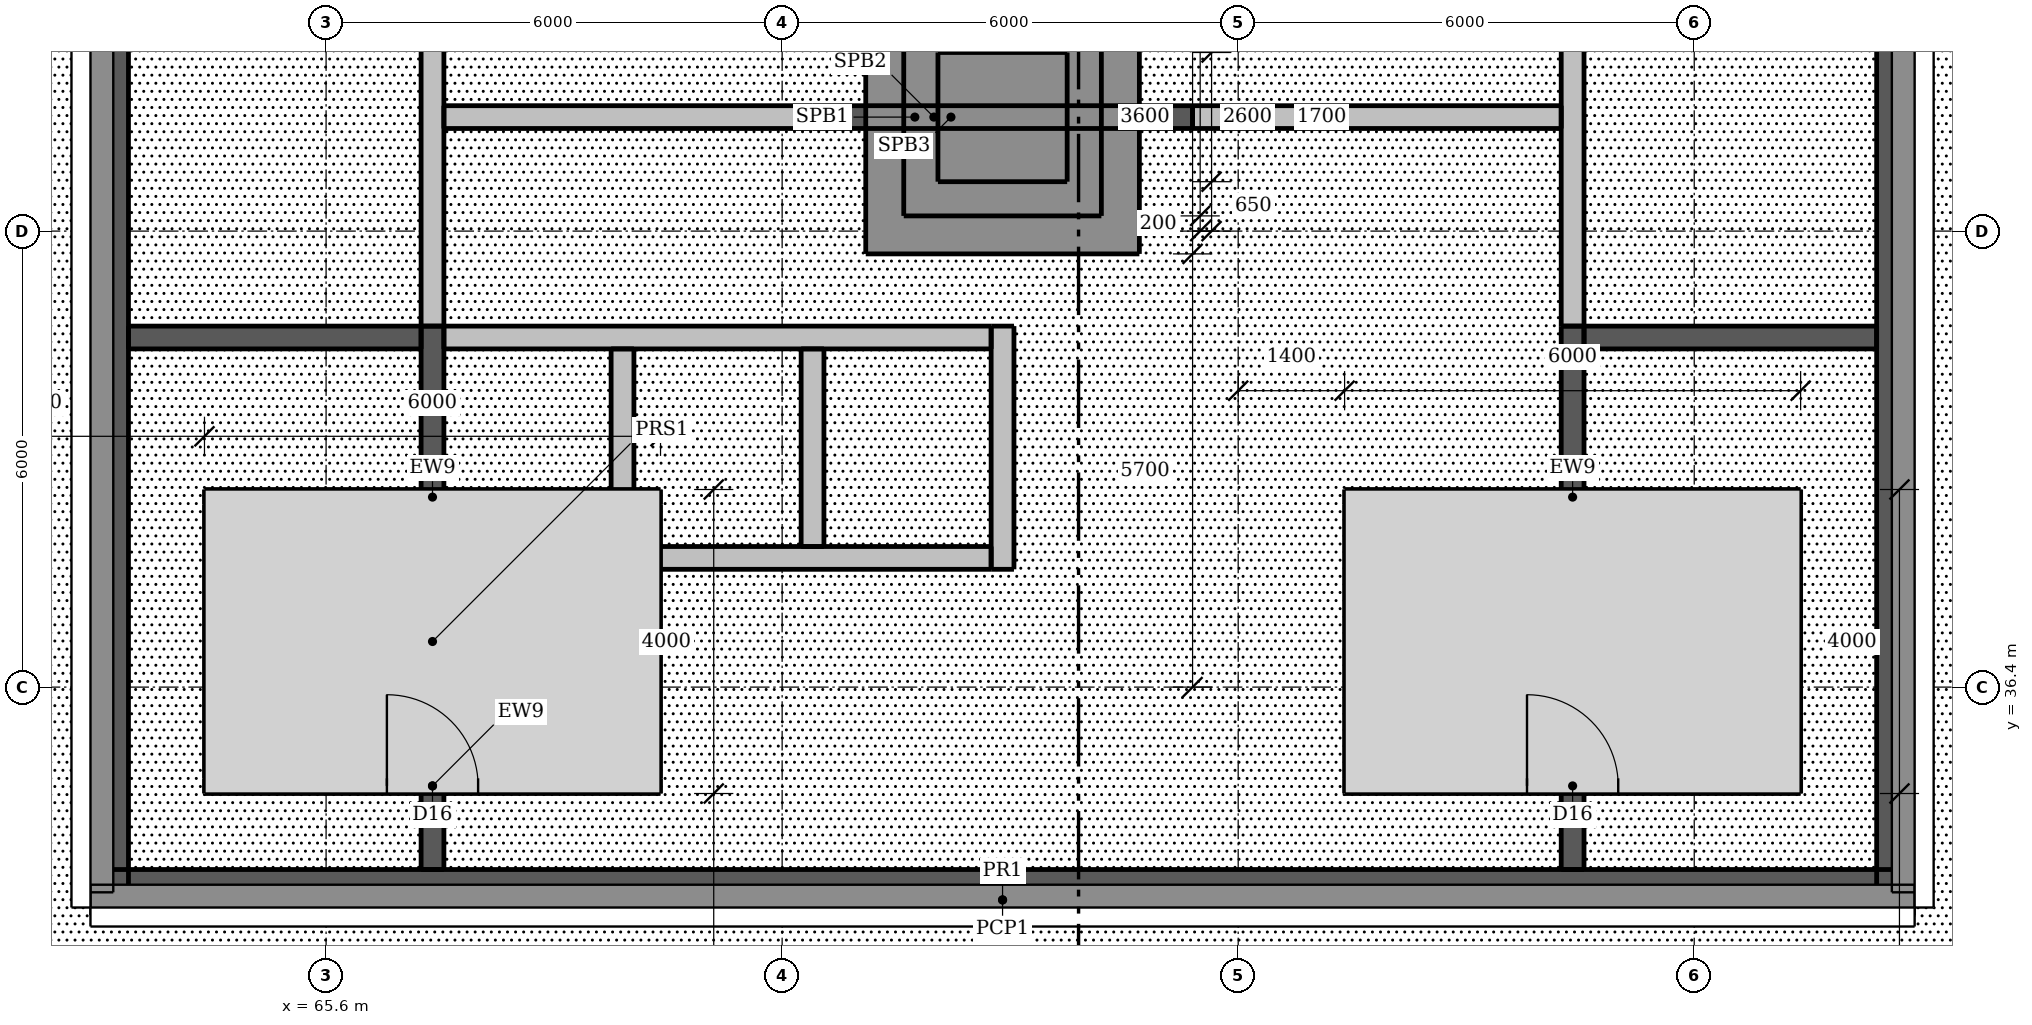
"""IFC4 building model, lengths in metres.
Left out: names, types, materials, properties, quantities, classifications, styles, units other than length and angle.
Written with IfcOpenShell. Run it as: python <this file> out.ifc"""

import sys

from ifc_helpers import new_model, si_unit, direction, frame, frame_2d, origin, place, context, subcontext, project, spatial, polyline, rectangle, outline, extrude, element, fill, save


model = new_model("IFC4")
c1 = context("Model", 3, precision=1e-05, world=origin(), true_north=direction((0.0, 1.0)))
c2 = subcontext(c1, "Body", "Model", "MODEL_VIEW")
j1 = project(units=[si_unit("LENGTHUNIT", "METRE"), si_unit("PLANEANGLEUNIT", "RADIAN")], contexts=[c1])
p1 = place(None, origin())
s1 = spatial("IfcSite", under=j1, at=p1, CompositionType="ELEMENT")
p2 = place(p1, origin())
s2 = spatial("IfcBuilding", under=s1, at=p2, CompositionType="ELEMENT")
p3 = place(p2, frame((0.0, 0.0, 301.6)))
s3 = spatial("IfcBuildingStorey", under=s2, at=p3, CompositionType="ELEMENT", Elevation=301.6)
for number, where, z_axis, x_axis in (
    (1, (62.5, 33.75, 0.0), (0.0, 0.0, 1.0), (1.0, 0.0, 0.0)),
    (2, (62.75, 33.5, 0.0), (0.0, 0.0, 1.0), (0.0, 1.0, 0.0)),
    (3, (86.25, 33.5, 0.0), (0.0, 0.0, 1.0), (0.0, 1.0, 0.0)),
):
    element("IfcWall", number, at=place(p3, frame(where, z_axis=z_axis, x_axis=x_axis)), inside=s3, PredefinedType="SHEAR", context=c2, shape_type="SweptSolid", body=[
        extrude(rectangle(XDim=24.0, YDim=0.5, at=frame_2d((12.0, 0.0))), origin(), (0.0, 0.0, 1.0), 6.9),
    ])
p4 = place(p3, frame((72.0, 43.9, 0.0), z_axis=(0.0, 0.0, 1.0), x_axis=(1.0, 0.0, 0.0)))
e4 = element("IfcWall", 4, at=p4, inside=s3, PredefinedType="SHEAR", context=c2, shape_type="SweptSolid", body=[
    extrude(rectangle(XDim=5.0, YDim=0.3, at=frame_2d((2.5, 0.0))), origin(), (0.0, 0.0, 1.0), 6.9),
])
p5 = place(p3, frame((62.5, 33.6, 7.2), z_axis=(0.0, 0.0, 1.0), x_axis=(1.0, 0.0, 0.0)))
e5 = element("IfcWall", 5, at=p5, inside=s3, PredefinedType="PARAPET", context=c2, shape_type="SweptSolid", body=[
    extrude(rectangle(XDim=24.0, YDim=0.2, at=frame_2d((12.0, 0.0))), origin(), (0.0, 0.0, 1.0), 1.1),
])
for number, where, z_axis, x_axis in (
    (6, (62.6, 33.7, 7.2), (0.0, 0.0, 1.0), (0.0, 1.0, 0.0)),
    (7, (86.4, 33.7, 7.2), (0.0, 0.0, 1.0), (0.0, 1.0, 0.0)),
):
    element("IfcWall", number, at=place(p3, frame(where, z_axis=z_axis, x_axis=x_axis)), inside=s3, PredefinedType="PARAPET", context=c2, shape_type="SweptSolid", body=[
        extrude(rectangle(XDim=23.6, YDim=0.2, at=frame_2d((11.8, 0.0))), origin(), (0.0, 0.0, 1.0), 1.1),
    ])
p6 = place(p3, frame((0.0, 0.0, 7.2)))
e8 = element("IfcWall", 8, at=p6, inside=s3, PredefinedType="SOLIDWALL", context=c2, shape_type="SweptSolid", body=[
    extrude(outline(polyline([(72.7, 42.1), (76.3, 42.1), (76.3, 45.7), (72.7, 45.7), (72.7, 42.1)]), holes=[polyline([(75.008, 44.111), (74.71, 44.408), (74.29, 44.408), (73.992, 44.111), (73.992, 43.689), (74.29, 43.392), (74.71, 43.392), (75.008, 43.689), (75.008, 44.111)])]), origin(), (0.0, 0.0, 1.0), 2.6),
])
p7 = place(p3, frame((0.0, 0.0, 9.8)))
e9 = element("IfcWall", 9, at=p7, inside=s3, PredefinedType="SOLIDWALL", context=c2, shape_type="SweptSolid", body=[
    extrude(outline(polyline([(73.2, 42.6), (75.8, 42.6), (75.8, 45.2), (73.2, 45.2), (73.2, 42.6)]), holes=[polyline([(75.008, 44.111), (74.71, 44.408), (74.29, 44.408), (73.992, 44.111), (73.992, 43.689), (74.29, 43.392), (74.71, 43.392), (75.008, 43.689), (75.008, 44.111)])]), origin(), (0.0, 0.0, 1.0), 2.6),
])
p8 = place(p3, frame((0.0, 0.0, 12.4)))
e10 = element("IfcWall", 10, at=p8, inside=s3, PredefinedType="SOLIDWALL", context=c2, shape_type="SweptSolid", body=[
    extrude(outline(polyline([(73.65, 43.05), (75.35, 43.05), (75.35, 44.75), (73.65, 44.75), (73.65, 43.05)]), holes=[polyline([(75.008, 44.111), (74.71, 44.408), (74.29, 44.408), (73.992, 44.111), (73.992, 43.689), (74.29, 43.392), (74.71, 43.392), (75.008, 43.689), (75.008, 44.111)])]), origin(), (0.0, 0.0, 1.0), 2.2),
])
p9 = place(p3, frame((64.0, 35.1, 7.2), z_axis=(0.0, 0.0, 1.0), x_axis=(1.0, 0.0, 0.0)))
e11 = element("IfcWall", 11, at=p9, inside=s3, PredefinedType="SOLIDWALL", context=c2, shape_type="SweptSolid", body=[
    extrude(rectangle(XDim=6.0, YDim=0.2, at=frame_2d((3.0, 0.0))), origin(), (0.0, 0.0, 1.0), 3.0),
])
p10 = place(p9, frame((2.4, 0.0, 0.0)))
e12 = element("IfcOpeningElement", 12, at=p10, cuts=e11, PredefinedType="OPENING", context=c2, shape_type="SweptSolid", body=[
    extrude(rectangle(XDim=1.2, YDim=2.1, at=frame_2d((0.6, 1.05))), frame((0.0, 0.11, 0.0), z_axis=(0.0, -1.0, 0.0), x_axis=(1.0, 0.0, 0.0)), (0.0, 0.0, 1.0), 0.22),
])
p11 = place(p3, frame((64.0, 38.9, 7.2), z_axis=(0.0, 0.0, 1.0), x_axis=(1.0, 0.0, 0.0)))
e13 = element("IfcWall", 13, at=p11, inside=s3, PredefinedType="SOLIDWALL", context=c2, shape_type="SweptSolid", body=[
    extrude(rectangle(XDim=6.0, YDim=0.2, at=frame_2d((3.0, 0.0))), origin(), (0.0, 0.0, 1.0), 3.0),
])
for number, where, z_axis, x_axis in (
    (14, (64.1, 35.2, 7.2), (0.0, 0.0, 1.0), (0.0, 1.0, 0.0)),
    (15, (69.9, 35.2, 7.2), (0.0, 0.0, 1.0), (0.0, 1.0, 0.0)),
):
    element("IfcWall", number, at=place(p3, frame(where, z_axis=z_axis, x_axis=x_axis)), inside=s3, PredefinedType="SOLIDWALL", context=c2, shape_type="SweptSolid", body=[
        extrude(rectangle(XDim=3.6, YDim=0.2, at=frame_2d((1.8, 0.0))), origin(), (0.0, 0.0, 1.0), 3.0),
    ])
p12 = place(p3, frame((79.0, 35.1, 7.2), z_axis=(0.0, 0.0, 1.0), x_axis=(1.0, 0.0, 0.0)))
e16 = element("IfcWall", 16, at=p12, inside=s3, PredefinedType="SOLIDWALL", context=c2, shape_type="SweptSolid", body=[
    extrude(rectangle(XDim=6.0, YDim=0.2, at=frame_2d((3.0, 0.0))), origin(), (0.0, 0.0, 1.0), 3.0),
])
p13 = place(p12, frame((2.4, 0.0, 0.0)))
e17 = element("IfcOpeningElement", 17, at=p13, cuts=e16, PredefinedType="OPENING", context=c2, shape_type="SweptSolid", body=[
    extrude(rectangle(XDim=1.2, YDim=2.1, at=frame_2d((0.6, 1.05))), frame((0.0, 0.11, 0.0), z_axis=(0.0, -1.0, 0.0), x_axis=(1.0, 0.0, 0.0)), (0.0, 0.0, 1.0), 0.22),
])
p14 = place(p3, frame((79.0, 38.9, 7.2), z_axis=(0.0, 0.0, 1.0), x_axis=(1.0, 0.0, 0.0)))
e18 = element("IfcWall", 18, at=p14, inside=s3, PredefinedType="SOLIDWALL", context=c2, shape_type="SweptSolid", body=[
    extrude(rectangle(XDim=6.0, YDim=0.2, at=frame_2d((3.0, 0.0))), origin(), (0.0, 0.0, 1.0), 3.0),
])
for number, where, z_axis, x_axis in (
    (19, (79.1, 35.2, 7.2), (0.0, 0.0, 1.0), (0.0, 1.0, 0.0)),
    (20, (84.9, 35.2, 7.2), (0.0, 0.0, 1.0), (0.0, 1.0, 0.0)),
):
    element("IfcWall", number, at=place(p3, frame(where, z_axis=z_axis, x_axis=x_axis)), inside=s3, PredefinedType="SOLIDWALL", context=c2, shape_type="SweptSolid", body=[
        extrude(rectangle(XDim=3.6, YDim=0.2, at=frame_2d((1.8, 0.0))), origin(), (0.0, 0.0, 1.0), 3.0),
    ])
p15 = place(p3, frame((67.0, 34.0, 0.0), z_axis=(0.0, 0.0, 1.0), x_axis=(0.0, 1.0, 0.0)))
e21 = element("IfcWall", 21, at=p15, inside=s3, PredefinedType="SHEAR", context=c2, shape_type="SweptSolid", body=[
    extrude(rectangle(XDim=7.15, YDim=0.3, at=frame_2d((3.575, 0.0))), origin(), (0.0, 0.0, 1.0), 6.9),
])
p16 = place(p15, frame((0.2, 0.0, 0.0)))
e22 = element("IfcOpeningElement", 22, at=p16, cuts=e21, PredefinedType="OPENING", context=c2, shape_type="SweptSolid", body=[
    extrude(rectangle(XDim=1.1, YDim=2.1, at=frame_2d((0.55, 1.05))), frame((0.0, 0.16, 0.0), z_axis=(0.0, -1.0, 0.0), x_axis=(1.0, 0.0, 0.0)), (0.0, 0.0, 1.0), 0.32),
])
p17 = place(p3, frame((67.0, 41.15, 0.0), z_axis=(0.0, 0.0, 1.0), x_axis=(0.0, 1.0, 0.0)))
e23 = element("IfcWall", 23, at=p17, inside=s3, PredefinedType="PARTITIONING", context=c2, shape_type="SweptSolid", body=[
    extrude(rectangle(XDim=8.7, YDim=0.3, at=frame_2d((4.35, 0.0))), origin(), (0.0, 0.0, 1.0), 6.9),
])
p18 = place(p17, frame((3.9, 0.0, 0.0)))
e24 = element("IfcOpeningElement", 24, at=p18, cuts=e23, PredefinedType="OPENING", context=c2, shape_type="SweptSolid", body=[
    extrude(rectangle(XDim=0.9, YDim=2.1, at=frame_2d((0.45, 1.05))), frame((0.0, 0.16, 0.0), z_axis=(0.0, -1.0, 0.0), x_axis=(1.0, 0.0, 0.0)), (0.0, 0.0, 1.0), 0.32),
])
p19 = place(p3, frame((82.0, 34.0, 0.0), z_axis=(0.0, 0.0, 1.0), x_axis=(0.0, 1.0, 0.0)))
e25 = element("IfcWall", 25, at=p19, inside=s3, PredefinedType="SHEAR", context=c2, shape_type="SweptSolid", body=[
    extrude(rectangle(XDim=7.15, YDim=0.3, at=frame_2d((3.575, 0.0))), origin(), (0.0, 0.0, 1.0), 6.9),
])
p20 = place(p19, frame((0.2, 0.0, 0.0)))
e26 = element("IfcOpeningElement", 26, at=p20, cuts=e25, PredefinedType="OPENING", context=c2, shape_type="SweptSolid", body=[
    extrude(rectangle(XDim=1.1, YDim=2.1, at=frame_2d((0.55, 1.05))), frame((0.0, 0.16, 0.0), z_axis=(0.0, -1.0, 0.0), x_axis=(1.0, 0.0, 0.0)), (0.0, 0.0, 1.0), 0.32),
])
p21 = place(p3, frame((82.0, 41.15, 0.0), z_axis=(0.0, 0.0, 1.0), x_axis=(0.0, 1.0, 0.0)))
e27 = element("IfcWall", 27, at=p21, inside=s3, PredefinedType="PARTITIONING", context=c2, shape_type="SweptSolid", body=[
    extrude(rectangle(XDim=8.7, YDim=0.3, at=frame_2d((4.35, 0.0))), origin(), (0.0, 0.0, 1.0), 6.9),
])
p22 = place(p21, frame((3.9, 0.0, 0.0)))
e28 = element("IfcOpeningElement", 28, at=p22, cuts=e27, PredefinedType="OPENING", context=c2, shape_type="SweptSolid", body=[
    extrude(rectangle(XDim=0.9, YDim=2.1, at=frame_2d((0.45, 1.05))), frame((0.0, 0.16, 0.0), z_axis=(0.0, -1.0, 0.0), x_axis=(1.0, 0.0, 0.0)), (0.0, 0.0, 1.0), 0.32),
])
for number, where, z_axis, x_axis in (
    (29, (63.0, 41.0, 0.0), (0.0, 0.0, 1.0), (1.0, 0.0, 0.0)),
    (30, (82.15, 41.0, 0.0), (0.0, 0.0, 1.0), (1.0, 0.0, 0.0)),
):
    element("IfcWall", number, at=place(p3, frame(where, z_axis=z_axis, x_axis=x_axis)), inside=s3, PredefinedType="SHEAR", context=c2, shape_type="SweptSolid", body=[
        extrude(rectangle(XDim=3.85, YDim=0.3, at=frame_2d((1.925, 0.0))), origin(), (0.0, 0.0, 1.0), 6.9),
    ])
p23 = place(p3, frame((67.15, 43.9, 0.0), z_axis=(0.0, 0.0, 1.0), x_axis=(1.0, 0.0, 0.0)))
e31 = element("IfcWall", 31, at=p23, inside=s3, PredefinedType="PARTITIONING", context=c2, shape_type="SweptSolid", body=[
    extrude(rectangle(XDim=4.85, YDim=0.3, at=frame_2d((2.425, 0.0))), origin(), (0.0, 0.0, 1.0), 6.9),
])
p24 = place(p23, frame((1.9, 0.0, 0.0)))
e32 = element("IfcOpeningElement", 32, at=p24, cuts=e31, PredefinedType="OPENING", context=c2, shape_type="SweptSolid", body=[
    extrude(rectangle(XDim=0.9, YDim=2.1, at=frame_2d((0.45, 1.05))), frame((0.0, 0.16, 0.0), z_axis=(0.0, -1.0, 0.0), x_axis=(1.0, 0.0, 0.0)), (0.0, 0.0, 1.0), 0.32),
])
p25 = place(p3, frame((77.0, 43.9, 0.0), z_axis=(0.0, 0.0, 1.0), x_axis=(1.0, 0.0, 0.0)))
e33 = element("IfcWall", 33, at=p25, inside=s3, PredefinedType="PARTITIONING", context=c2, shape_type="SweptSolid", body=[
    extrude(rectangle(XDim=4.85, YDim=0.3, at=frame_2d((2.425, 0.0))), origin(), (0.0, 0.0, 1.0), 6.9),
])
p26 = place(p3, frame((67.15, 38.1, 0.0), z_axis=(0.0, 0.0, 1.0), x_axis=(1.0, 0.0, 0.0)))
e34 = element("IfcWall", 34, at=p26, inside=s3, PredefinedType="PARTITIONING", context=c2, shape_type="SweptSolid", body=[
    extrude(rectangle(XDim=7.2, YDim=0.3, at=frame_2d((3.6, 0.0))), origin(), (0.0, 0.0, 1.0), 6.9),
])
p27 = place(p26, frame((0.55, 0.0, 0.0)))
e35 = element("IfcOpeningElement", 35, at=p27, cuts=e34, PredefinedType="OPENING", context=c2, shape_type="SweptSolid", body=[
    extrude(rectangle(XDim=1.1, YDim=2.1, at=frame_2d((0.55, 1.05))), frame((0.0, 0.16, 0.0), z_axis=(0.0, -1.0, 0.0), x_axis=(1.0, 0.0, 0.0)), (0.0, 0.0, 1.0), 0.32),
])
p28 = place(p26, frame((3.05, 0.0, 0.0)))
e36 = element("IfcOpeningElement", 36, at=p28, cuts=e34, PredefinedType="OPENING", context=c2, shape_type="SweptSolid", body=[
    extrude(rectangle(XDim=1.1, YDim=2.1, at=frame_2d((0.55, 1.05))), frame((0.0, 0.16, 0.0), z_axis=(0.0, -1.0, 0.0), x_axis=(1.0, 0.0, 0.0)), (0.0, 0.0, 1.0), 0.32),
])
p29 = place(p26, frame((5.5, 0.0, 0.0)))
e37 = element("IfcOpeningElement", 37, at=p29, cuts=e34, PredefinedType="OPENING", context=c2, shape_type="SweptSolid", body=[
    extrude(rectangle(XDim=1.2, YDim=2.1, at=frame_2d((0.6, 1.05))), frame((0.0, 0.16, 0.0), z_axis=(0.0, -1.0, 0.0), x_axis=(1.0, 0.0, 0.0)), (0.0, 0.0, 1.0), 0.32),
])
p30 = place(p3, frame((67.15, 41.0, 0.0), z_axis=(0.0, 0.0, 1.0), x_axis=(1.0, 0.0, 0.0)))
e38 = element("IfcWall", 38, at=p30, inside=s3, PredefinedType="PARTITIONING", context=c2, shape_type="SweptSolid", body=[
    extrude(rectangle(XDim=7.2, YDim=0.3, at=frame_2d((3.6, 0.0))), origin(), (0.0, 0.0, 1.0), 6.9),
])
for number, where, z_axis, x_axis in (
    (39, (69.5, 38.25, 0.0), (0.0, 0.0, 1.0), (0.0, 1.0, 0.0)),
    (40, (72.0, 38.25, 0.0), (0.0, 0.0, 1.0), (0.0, 1.0, 0.0)),
):
    element("IfcWall", number, at=place(p3, frame(where, z_axis=z_axis, x_axis=x_axis)), inside=s3, PredefinedType="PARTITIONING", context=c2, shape_type="SweptSolid", body=[
        extrude(rectangle(XDim=2.6, YDim=0.3, at=frame_2d((1.3, 0.0))), origin(), (0.0, 0.0, 1.0), 6.9),
    ])
p31 = place(p3, frame((74.5, 37.95, 0.0), z_axis=(0.0, 0.0, 1.0), x_axis=(0.0, 1.0, 0.0)))
e41 = element("IfcWall", 41, at=p31, inside=s3, PredefinedType="PARTITIONING", context=c2, shape_type="SweptSolid", body=[
    extrude(rectangle(XDim=3.2, YDim=0.3, at=frame_2d((1.6, 0.0))), origin(), (0.0, 0.0, 1.0), 6.9),
])
p32 = place(p10, origin())
e42 = element("IfcDoor", 42, at=p32, inside=s3, OperationType="SINGLE_SWING_LEFT", PredefinedType="DOOR", context=c2, shape_type="SweptSolid", body=[
    extrude(rectangle(XDim=1.2, YDim=2.1, at=frame_2d((0.6, 1.05))), frame((0.0, 0.025, 0.0), z_axis=(0.0, -1.0, 0.0), x_axis=(1.0, 0.0, 0.0)), (0.0, 0.0, 1.0), 0.05),
])
fill(e12, e42)
p33 = place(p13, origin())
e43 = element("IfcDoor", 43, at=p33, inside=s3, OperationType="SINGLE_SWING_LEFT", PredefinedType="DOOR", context=c2, shape_type="SweptSolid", body=[
    extrude(rectangle(XDim=1.2, YDim=2.1, at=frame_2d((0.6, 1.05))), frame((0.0, 0.025, 0.0), z_axis=(0.0, -1.0, 0.0), x_axis=(1.0, 0.0, 0.0)), (0.0, 0.0, 1.0), 0.05),
])
fill(e17, e43)
p34 = place(p16, origin())
e44 = element("IfcDoor", 44, at=p34, inside=s3, OperationType="SINGLE_SWING_LEFT", PredefinedType="DOOR", context=c2, shape_type="SweptSolid", body=[
    extrude(rectangle(XDim=1.1, YDim=2.1, at=frame_2d((0.55, 1.05))), frame((0.0, 0.138, 0.0), z_axis=(0.0, -1.0, 0.0), x_axis=(1.0, 0.0, 0.0)), (0.0, 0.0, 1.0), 0.05),
])
fill(e22, e44)
p35 = place(p20, origin())
e45 = element("IfcDoor", 45, at=p35, inside=s3, OperationType="SINGLE_SWING_RIGHT", PredefinedType="DOOR", context=c2, shape_type="SweptSolid", body=[
    extrude(rectangle(XDim=1.1, YDim=2.1, at=frame_2d((0.55, 1.05))), frame((0.0, -0.087, 0.0), z_axis=(0.0, -1.0, 0.0), x_axis=(1.0, 0.0, 0.0)), (0.0, 0.0, 1.0), 0.05),
])
fill(e26, e45)
p36 = place(p24, origin())
e46 = element("IfcDoor", 46, at=p36, inside=s3, OperationType="SINGLE_SWING_LEFT", PredefinedType="DOOR", context=c2, shape_type="SweptSolid", body=[
    extrude(rectangle(XDim=0.9, YDim=2.1, at=frame_2d((0.45, 1.05))), frame((0.0, 0.138, 0.0), z_axis=(0.0, -1.0, 0.0), x_axis=(1.0, 0.0, 0.0)), (0.0, 0.0, 1.0), 0.05),
])
fill(e32, e46)
p37 = place(p27, origin())
e47 = element("IfcDoor", 47, at=p37, inside=s3, OperationType="DOUBLE_DOOR_SLIDING", PredefinedType="DOOR", context=c2, shape_type="SweptSolid", body=[
    extrude(rectangle(XDim=1.1, YDim=2.1, at=frame_2d((0.55, 1.05))), frame((0.0, 0.025, 0.0), z_axis=(0.0, -1.0, 0.0), x_axis=(1.0, 0.0, 0.0)), (0.0, 0.0, 1.0), 0.05),
])
fill(e35, e47)
p38 = place(p28, origin())
e48 = element("IfcDoor", 48, at=p38, inside=s3, OperationType="DOUBLE_DOOR_SLIDING", PredefinedType="DOOR", context=c2, shape_type="SweptSolid", body=[
    extrude(rectangle(XDim=1.1, YDim=2.1, at=frame_2d((0.55, 1.05))), frame((0.0, 0.025, 0.0), z_axis=(0.0, -1.0, 0.0), x_axis=(1.0, 0.0, 0.0)), (0.0, 0.0, 1.0), 0.05),
])
fill(e36, e48)
p39 = place(p29, origin())
e49 = element("IfcDoor", 49, at=p39, inside=s3, OperationType="DOUBLE_DOOR_SLIDING", PredefinedType="DOOR", context=c2, shape_type="SweptSolid", body=[
    extrude(rectangle(XDim=1.2, YDim=2.1, at=frame_2d((0.6, 1.05))), frame((0.0, 0.025, 0.0), z_axis=(0.0, -1.0, 0.0), x_axis=(1.0, 0.0, 0.0)), (0.0, 0.0, 1.0), 0.05),
])
fill(e37, e49)
save(model, sys.argv[1])
